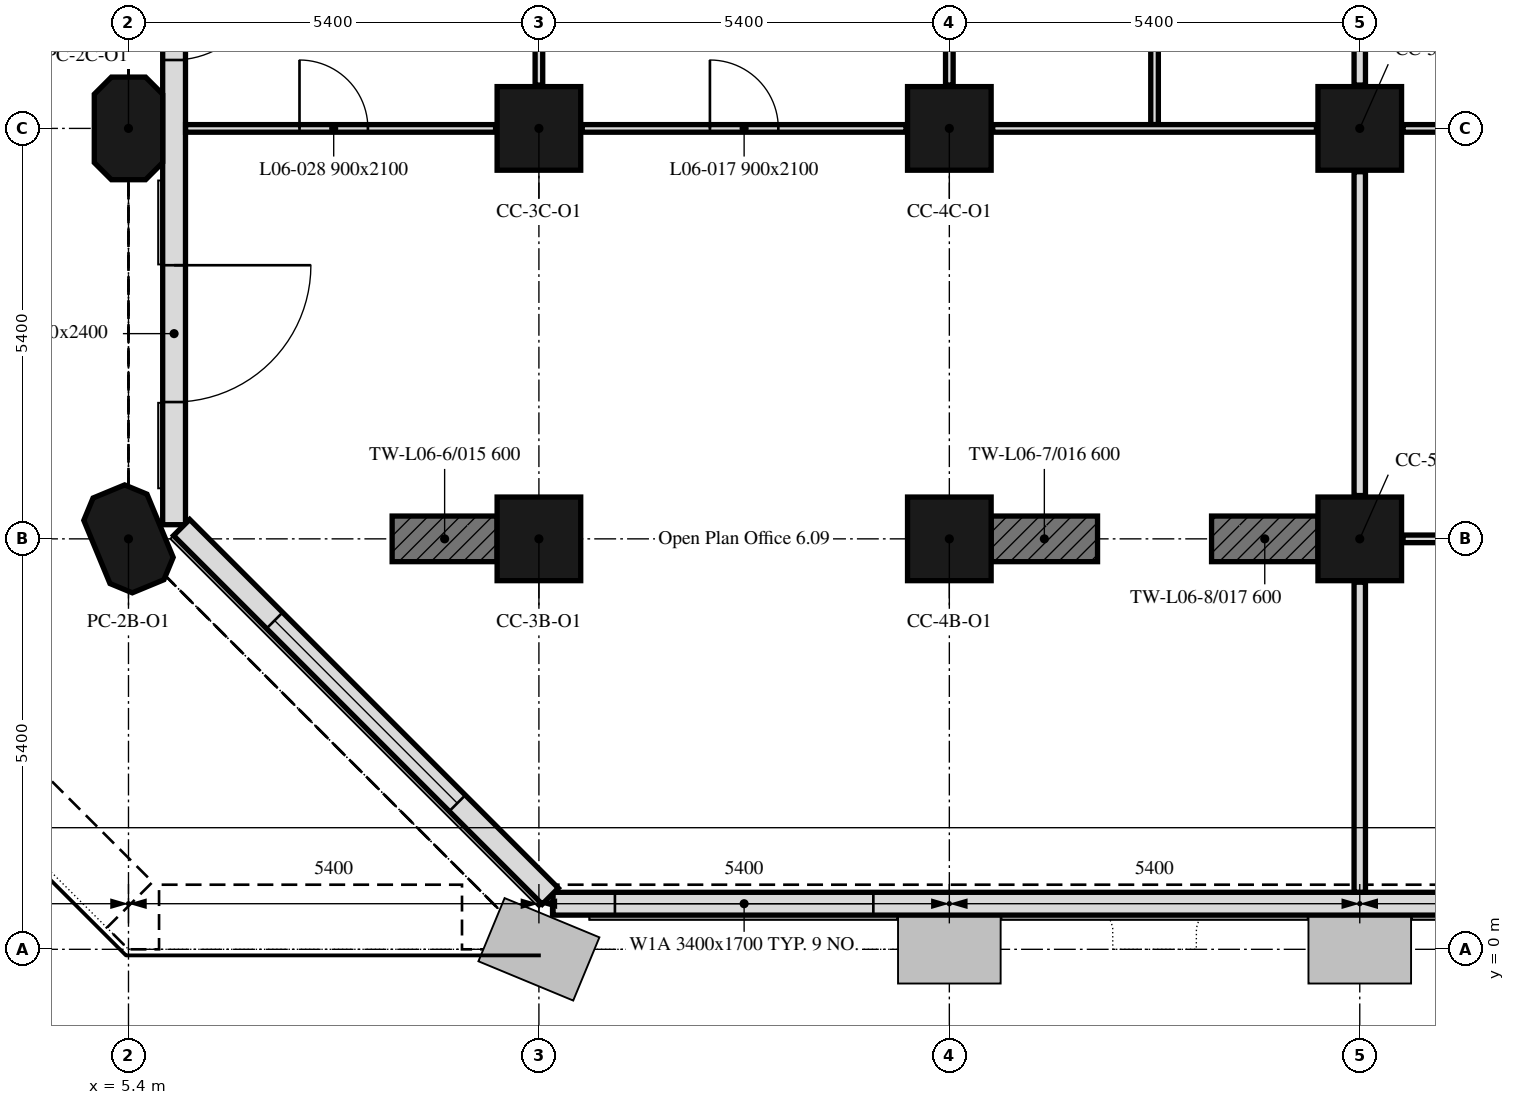
"""IFC4 building model, lengths in metres.
Left out: names, types, materials, properties, quantities, classifications, styles, units other than length and angle.
Written with IfcOpenShell. Run it as: python <this file> out.ifc"""

import sys

from ifc_helpers import new_model, si_unit, direction, frame, frame_2d, origin, origin_2d, place, context, subcontext, project, spatial, polyline, rectangle, outline, extrude, element, fill, save


model = new_model("IFC4")
c1 = context("Model", 3, precision=1e-05, world=origin(), true_north=direction((0.0, 1.0)))
c2 = subcontext(c1, "Body", "Model", "MODEL_VIEW")
j1 = project(units=[si_unit("LENGTHUNIT", "METRE"), si_unit("PLANEANGLEUNIT", "RADIAN")], contexts=[c1])
p1 = place(None, origin())
s1 = spatial("IfcSite", under=j1, at=p1, CompositionType="ELEMENT")
p2 = place(p1, origin())
s2 = spatial("IfcBuilding", under=s1, at=p2, CompositionType="ELEMENT")
p3 = place(p2, frame((0.0, 0.0, 33.6)))
s3 = spatial("IfcBuildingStorey", under=s2, at=p3, CompositionType="ELEMENT", Elevation=33.6)
p4 = place(p3, frame((5.4, 5.4, 0.0), z_axis=(0.0, 0.0, 1.0), x_axis=(-0.382683432365, 0.923879532511, 0.0)))
e1 = element("IfcColumn", 1, at=p4, inside=s3, PredefinedType="COLUMN", context=c2, shape_type="SweptSolid", body=[
    extrude(outline(polyline([(-0.45, -0.45), (0.45, -0.45), (0.675, -0.225), (0.675, 0.225), (0.45, 0.45), (-0.45, 0.45), (-0.675, 0.225), (-0.675, -0.225), (-0.45, -0.45)])), origin(), (0.0, 0.0, 1.0), 3.5),
])
for number, where, z_axis, x_axis in (
    (2, (10.8, 5.4, 0.0), (0.0, 0.0, 1.0), (1.0, 0.0, 0.0)),
    (3, (16.2, 5.4, 0.0), (0.0, 0.0, 1.0), (1.0, 0.0, 0.0)),
    (4, (21.6, 5.4, 0.0), (0.0, 0.0, 1.0), (1.0, 0.0, 0.0)),
):
    element("IfcColumn", number, at=place(p3, frame(where, z_axis=z_axis, x_axis=x_axis)), inside=s3, PredefinedType="COLUMN", context=c2, shape_type="SweptSolid", body=[
        extrude(rectangle(XDim=1.1, YDim=1.1, at=origin_2d()), origin(), (0.0, 0.0, 1.0), 3.5),
    ])
p5 = place(p3, frame((5.4, 10.8, 0.0), z_axis=(0.0, 0.0, 1.0), x_axis=(0.0, 1.0, 0.0)))
e5 = element("IfcColumn", 5, at=p5, inside=s3, PredefinedType="COLUMN", context=c2, shape_type="SweptSolid", body=[
    extrude(outline(polyline([(-0.45, -0.45), (0.45, -0.45), (0.675, -0.225), (0.675, 0.225), (0.45, 0.45), (-0.45, 0.45), (-0.675, 0.225), (-0.675, -0.225), (-0.45, -0.45)])), origin(), (0.0, 0.0, 1.0), 3.5),
])
for number, where, z_axis, x_axis in (
    (6, (10.8, 10.8, 0.0), (0.0, 0.0, 1.0), (1.0, 0.0, 0.0)),
    (7, (16.2, 10.8, 0.0), (0.0, 0.0, 1.0), (1.0, 0.0, 0.0)),
    (8, (21.6, 10.8, 0.0), (0.0, 0.0, 1.0), (1.0, 0.0, 0.0)),
):
    element("IfcColumn", number, at=place(p3, frame(where, z_axis=z_axis, x_axis=x_axis)), inside=s3, PredefinedType="COLUMN", context=c2, shape_type="SweptSolid", body=[
        extrude(rectangle(XDim=1.1, YDim=1.1, at=origin_2d()), origin(), (0.0, 0.0, 1.0), 3.5),
    ])
p6 = place(p3, frame((8.869, 5.4, 0.0), z_axis=(0.0, 0.0, 1.0), x_axis=(1.0, 0.0, 0.0)))
e9 = element("IfcWall", 9, at=p6, inside=s3, PredefinedType="SHEAR", context=c2, shape_type="SweptSolid", body=[
    extrude(rectangle(XDim=1.381, YDim=0.6, at=frame_2d((0.69, 0.0))), origin(), (0.0, 0.0, 1.0), 3.5),
])
p7 = place(p3, frame((16.75, 5.4, 0.0), z_axis=(0.0, 0.0, 1.0), x_axis=(1.0, 0.0, 0.0)))
e10 = element("IfcWall", 10, at=p7, inside=s3, PredefinedType="SHEAR", context=c2, shape_type="SweptSolid", body=[
    extrude(rectangle(XDim=1.4, YDim=0.6, at=frame_2d((0.7, 0.0))), origin(), (0.0, 0.0, 1.0), 3.5),
])
p8 = place(p3, frame((19.65, 5.4, 0.0), z_axis=(0.0, 0.0, 1.0), x_axis=(1.0, 0.0, 0.0)))
e11 = element("IfcWall", 11, at=p8, inside=s3, PredefinedType="SHEAR", context=c2, shape_type="SweptSolid", body=[
    extrude(rectangle(XDim=1.4, YDim=0.6, at=frame_2d((0.7, 0.0))), origin(), (0.0, 0.0, 1.0), 3.5),
])
p9 = place(p3, frame((10.986, 0.6, 0.0), z_axis=(0.0, 0.0, 1.0), x_axis=(1.0, 0.0, 0.0)))
e12 = element("IfcWall", 12, at=p9, inside=s3, PredefinedType="SOLIDWALL", context=c2, shape_type="SweptSolid", body=[
    extrude(rectangle(XDim=32.027, YDim=0.3, at=frame_2d((16.014, 0.0))), origin(), (0.0, 0.0, 1.0), 3.5),
])
p10 = place(p9, frame((0.814, 0.0, 0.9)))
e13 = element("IfcOpeningElement", 13, at=p10, cuts=e12, PredefinedType="OPENING", context=c2, shape_type="SweptSolid", body=[
    extrude(rectangle(XDim=3.4, YDim=1.7, at=frame_2d((1.7, 0.85))), frame((0.0, 0.16, 0.0), z_axis=(0.0, -1.0, 0.0), x_axis=(1.0, 0.0, 0.0)), (0.0, 0.0, 1.0), 0.32),
])
p11 = place(p3, frame((6.0, 16.2, 0.0), z_axis=(0.0, 0.0, 1.0), x_axis=(0.0, -1.0, 0.0)))
e14 = element("IfcWall", 14, at=p11, inside=s3, PredefinedType="SOLIDWALL", context=c2, shape_type="SweptSolid", body=[
    extrude(rectangle(XDim=10.614, YDim=0.3, at=frame_2d((5.307, 0.0))), origin(), (0.0, 0.0, 1.0), 3.5),
])
p12 = place(p11, frame((3.3, 0.0, 0.0)))
e15 = element("IfcOpeningElement", 15, at=p12, cuts=e14, PredefinedType="OPENING", context=c2, shape_type="SweptSolid", body=[
    extrude(rectangle(XDim=1.2, YDim=2.4, at=frame_2d((0.6, 1.2))), frame((0.0, 0.16, 0.0), z_axis=(0.0, -1.0, 0.0), x_axis=(1.0, 0.0, 0.0)), (0.0, 0.0, 1.0), 0.32),
])
p13 = place(p11, frame((7.2, 0.0, 0.0)))
e16 = element("IfcOpeningElement", 16, at=p13, cuts=e14, PredefinedType="OPENING", context=c2, shape_type="SweptSolid", body=[
    extrude(rectangle(XDim=1.8, YDim=2.4, at=frame_2d((0.9, 1.2))), frame((0.0, 0.16, 0.0), z_axis=(0.0, -1.0, 0.0), x_axis=(1.0, 0.0, 0.0)), (0.0, 0.0, 1.0), 0.32),
])
p14 = place(p3, frame((6.099, 5.55, 0.0), z_axis=(0.0, 0.0, 1.0), x_axis=(0.707106781187, -0.707106781187, 0.0)))
e17 = element("IfcWall", 17, at=p14, inside=s3, PredefinedType="SOLIDWALL", context=c2, shape_type="SweptSolid", body=[
    extrude(rectangle(XDim=6.86, YDim=0.3, at=frame_2d((3.43, 0.0))), origin(), (0.0, 0.0, 1.0), 3.5),
])
p15 = place(p14, frame((1.73, 0.0, 0.9)))
e18 = element("IfcOpeningElement", 18, at=p15, cuts=e17, PredefinedType="OPENING", context=c2, shape_type="SweptSolid", body=[
    extrude(rectangle(XDim=3.4, YDim=1.7, at=frame_2d((1.7, 0.85))), frame((0.0, 0.16, 0.0), z_axis=(0.0, -1.0, 0.0), x_axis=(1.0, 0.0, 0.0)), (0.0, 0.0, 1.0), 0.32),
])
p16 = place(p3, frame((6.151, 10.8, 0.0), z_axis=(0.0, 0.0, 1.0), x_axis=(1.0, 0.0, 0.0)))
e19 = element("IfcWall", 19, at=p16, inside=s3, PredefinedType="PARTITIONING", context=c2, shape_type="SweptSolid", body=[
    extrude(rectangle(XDim=4.079, YDim=0.1, at=frame_2d((2.04, 0.0))), origin(), (0.0, 0.0, 1.0), 3.5),
])
p17 = place(p16, frame((1.499, 0.0, 0.0)))
e20 = element("IfcOpeningElement", 20, at=p17, cuts=e19, PredefinedType="OPENING", context=c2, shape_type="SweptSolid", body=[
    extrude(rectangle(XDim=0.9, YDim=2.1, at=frame_2d((0.45, 1.05))), frame((0.0, 0.05, 0.0), z_axis=(0.0, -1.0, 0.0), x_axis=(1.0, 0.0, 0.0)), (0.0, 0.0, 1.0), 0.1),
])
p18 = place(p3, frame((10.8, 11.37, 0.0), z_axis=(0.0, 0.0, 1.0), x_axis=(0.0, 1.0, 0.0)))
e21 = element("IfcWall", 21, at=p18, inside=s3, PredefinedType="PARTITIONING", context=c2, shape_type="SweptSolid", body=[
    extrude(rectangle(XDim=2.055, YDim=0.1, at=frame_2d((1.027, 0.0))), origin(), (0.0, 0.0, 1.0), 3.5),
])
p19 = place(p3, frame((11.37, 10.8, 0.0), z_axis=(0.0, 0.0, 1.0), x_axis=(1.0, 0.0, 0.0)))
e22 = element("IfcWall", 22, at=p19, inside=s3, PredefinedType="PARTITIONING", context=c2, shape_type="SweptSolid", body=[
    extrude(rectangle(XDim=4.26, YDim=0.1, at=frame_2d((2.13, 0.0))), origin(), (0.0, 0.0, 1.0), 3.5),
])
p20 = place(p19, frame((1.68, 0.0, 0.0)))
e23 = element("IfcOpeningElement", 23, at=p20, cuts=e22, PredefinedType="OPENING", context=c2, shape_type="SweptSolid", body=[
    extrude(rectangle(XDim=0.9, YDim=2.1, at=frame_2d((0.45, 1.05))), frame((0.0, 0.05, 0.0), z_axis=(0.0, -1.0, 0.0), x_axis=(1.0, 0.0, 0.0)), (0.0, 0.0, 1.0), 0.1),
])
p21 = place(p3, frame((16.2, 11.37, 0.0), z_axis=(0.0, 0.0, 1.0), x_axis=(0.0, 1.0, 0.0)))
e24 = element("IfcWall", 24, at=p21, inside=s3, PredefinedType="PARTITIONING", context=c2, shape_type="SweptSolid", body=[
    extrude(rectangle(XDim=2.055, YDim=0.1, at=frame_2d((1.027, 0.0))), origin(), (0.0, 0.0, 1.0), 2.75),
])
p22 = place(p3, frame((18.9, 10.85, 0.0), z_axis=(0.0, 0.0, 1.0), x_axis=(0.0, 1.0, 0.0)))
e25 = element("IfcWall", 25, at=p22, inside=s3, PredefinedType="PARTITIONING", context=c2, shape_type="SweptSolid", body=[
    extrude(rectangle(XDim=2.575, YDim=0.1, at=frame_2d((1.288, 0.0))), origin(), (0.0, 0.0, 1.0), 3.5),
])
p23 = place(p3, frame((16.77, 10.8, 0.0), z_axis=(0.0, 0.0, 1.0), x_axis=(1.0, 0.0, 0.0)))
e26 = element("IfcWall", 26, at=p23, inside=s3, PredefinedType="PARTITIONING", context=c2, shape_type="SweptSolid", body=[
    extrude(rectangle(XDim=4.26, YDim=0.1, at=frame_2d((2.13, 0.0))), origin(), (0.0, 0.0, 1.0), 3.5),
])
p24 = place(p3, frame((21.6, 11.37, 0.0), z_axis=(0.0, 0.0, 1.0), x_axis=(0.0, 1.0, 0.0)))
e27 = element("IfcWall", 27, at=p24, inside=s3, PredefinedType="PARTITIONING", context=c2, shape_type="SweptSolid", body=[
    extrude(rectangle(XDim=2.055, YDim=0.15, at=frame_2d((1.027, 0.0))), origin(), (0.0, 0.0, 1.0), 2.75),
])
p25 = place(p3, frame((21.6, 10.23, 0.0), z_axis=(0.0, 0.0, 1.0), x_axis=(0.0, -1.0, 0.0)))
e28 = element("IfcWall", 28, at=p25, inside=s3, PredefinedType="PARTITIONING", context=c2, shape_type="SweptSolid", body=[
    extrude(rectangle(XDim=4.26, YDim=0.15, at=frame_2d((2.13, 0.0))), origin(), (0.0, 0.0, 1.0), 2.75),
])
p26 = place(p3, frame((21.6, 4.83, 0.0), z_axis=(0.0, 0.0, 1.0), x_axis=(0.0, -1.0, 0.0)))
e29 = element("IfcWall", 29, at=p26, inside=s3, PredefinedType="PARTITIONING", context=c2, shape_type="SweptSolid", body=[
    extrude(rectangle(XDim=4.079, YDim=0.15, at=frame_2d((2.04, 0.0))), origin(), (0.0, 0.0, 1.0), 2.75),
])
p27 = place(p3, frame((22.17, 10.8, 0.0), z_axis=(0.0, 0.0, 1.0), x_axis=(1.0, 0.0, 0.0)))
e30 = element("IfcWall", 30, at=p27, inside=s3, PredefinedType="PARTITIONING", context=c2, shape_type="SweptSolid", body=[
    extrude(rectangle(XDim=4.26, YDim=0.1, at=frame_2d((2.13, 0.0))), origin(), (0.0, 0.0, 1.0), 3.5),
])
p28 = place(p27, frame((1.68, 0.0, 0.0)))
e31 = element("IfcOpeningElement", 31, at=p28, cuts=e30, PredefinedType="OPENING", context=c2, shape_type="SweptSolid", body=[
    extrude(rectangle(XDim=0.9, YDim=2.1, at=frame_2d((0.45, 1.05))), frame((0.0, 0.05, 0.0), z_axis=(0.0, -1.0, 0.0), x_axis=(1.0, 0.0, 0.0)), (0.0, 0.0, 1.0), 0.1),
])
p29 = place(p3, frame((22.17, 5.4, 0.0), z_axis=(0.0, 0.0, 1.0), x_axis=(1.0, 0.0, 0.0)))
e32 = element("IfcWall", 32, at=p29, inside=s3, PredefinedType="PARTITIONING", context=c2, shape_type="SweptSolid", body=[
    extrude(rectangle(XDim=4.26, YDim=0.1, at=frame_2d((2.13, 0.0))), origin(), (0.0, 0.0, 1.0), 3.5),
])
p30 = place(p29, frame((1.68, 0.0, 0.0)))
e33 = element("IfcOpeningElement", 33, at=p30, cuts=e32, PredefinedType="OPENING", context=c2, shape_type="SweptSolid", body=[
    extrude(rectangle(XDim=0.9, YDim=2.1, at=frame_2d((0.45, 1.05))), frame((0.0, 0.05, 0.0), z_axis=(0.0, -1.0, 0.0), x_axis=(1.0, 0.0, 0.0)), (0.0, 0.0, 1.0), 0.1),
])
p31 = place(p12, origin())
e34 = element("IfcDoor", 34, at=p31, inside=s3, OperationType="SINGLE_SWING_LEFT", PredefinedType="DOOR", context=c2, shape_type="SweptSolid", body=[
    extrude(rectangle(XDim=1.2, YDim=2.4, at=frame_2d((0.6, 1.2))), frame((0.0, 0.025, 0.0), z_axis=(0.0, -1.0, 0.0), x_axis=(1.0, 0.0, 0.0)), (0.0, 0.0, 1.0), 0.05),
])
fill(e15, e34)
p32 = place(p13, origin())
e35 = element("IfcDoor", 35, at=p32, inside=s3, OperationType="DOUBLE_DOOR_DOUBLE_SWING", PredefinedType="DOOR", context=c2, shape_type="SweptSolid", body=[
    extrude(rectangle(XDim=1.8, YDim=2.4, at=frame_2d((0.9, 1.2))), frame((0.0, 0.025, 0.0), z_axis=(0.0, -1.0, 0.0), x_axis=(1.0, 0.0, 0.0)), (0.0, 0.0, 1.0), 0.05),
])
fill(e16, e35)
p33 = place(p10, origin())
e36 = element("IfcWindow", 36, at=p33, inside=s3, PartitioningType="SINGLE_PANEL", PredefinedType="WINDOW", context=c2, shape_type="SweptSolid", body=[
    extrude(rectangle(XDim=3.4, YDim=1.7, at=frame_2d((1.7, 0.85))), frame((0.0, 0.03, 0.0), z_axis=(0.0, -1.0, 0.0), x_axis=(1.0, 0.0, 0.0)), (0.0, 0.0, 1.0), 0.06),
])
fill(e13, e36)
p34 = place(p15, origin())
e37 = element("IfcWindow", 37, at=p34, inside=s3, PartitioningType="SINGLE_PANEL", PredefinedType="WINDOW", context=c2, shape_type="SweptSolid", body=[
    extrude(rectangle(XDim=3.4, YDim=1.7, at=frame_2d((1.7, 0.85))), frame((0.0, 0.03, 0.0), z_axis=(0.0, -1.0, 0.0), x_axis=(1.0, 0.0, 0.0)), (0.0, 0.0, 1.0), 0.06),
])
fill(e18, e37)
p35 = place(p20, origin())
e38 = element("IfcDoor", 38, at=p35, inside=s3, OperationType="SINGLE_SWING_LEFT", PredefinedType="DOOR", context=c2, shape_type="SweptSolid", body=[
    extrude(rectangle(XDim=0.9, YDim=2.1, at=frame_2d((0.45, 1.05))), frame((0.0, 0.025, 0.0), z_axis=(0.0, -1.0, 0.0), x_axis=(1.0, 0.0, 0.0)), (0.0, 0.0, 1.0), 0.05),
])
fill(e23, e38)
p36 = place(p17, origin())
e39 = element("IfcDoor", 39, at=p36, inside=s3, OperationType="SINGLE_SWING_RIGHT", PredefinedType="DOOR", context=c2, shape_type="SweptSolid", body=[
    extrude(rectangle(XDim=0.9, YDim=2.1, at=frame_2d((0.45, 1.05))), frame((0.0, 0.025, 0.0), z_axis=(0.0, -1.0, 0.0), x_axis=(1.0, 0.0, 0.0)), (0.0, 0.0, 1.0), 0.05),
])
fill(e20, e39)
save(model, sys.argv[1])
